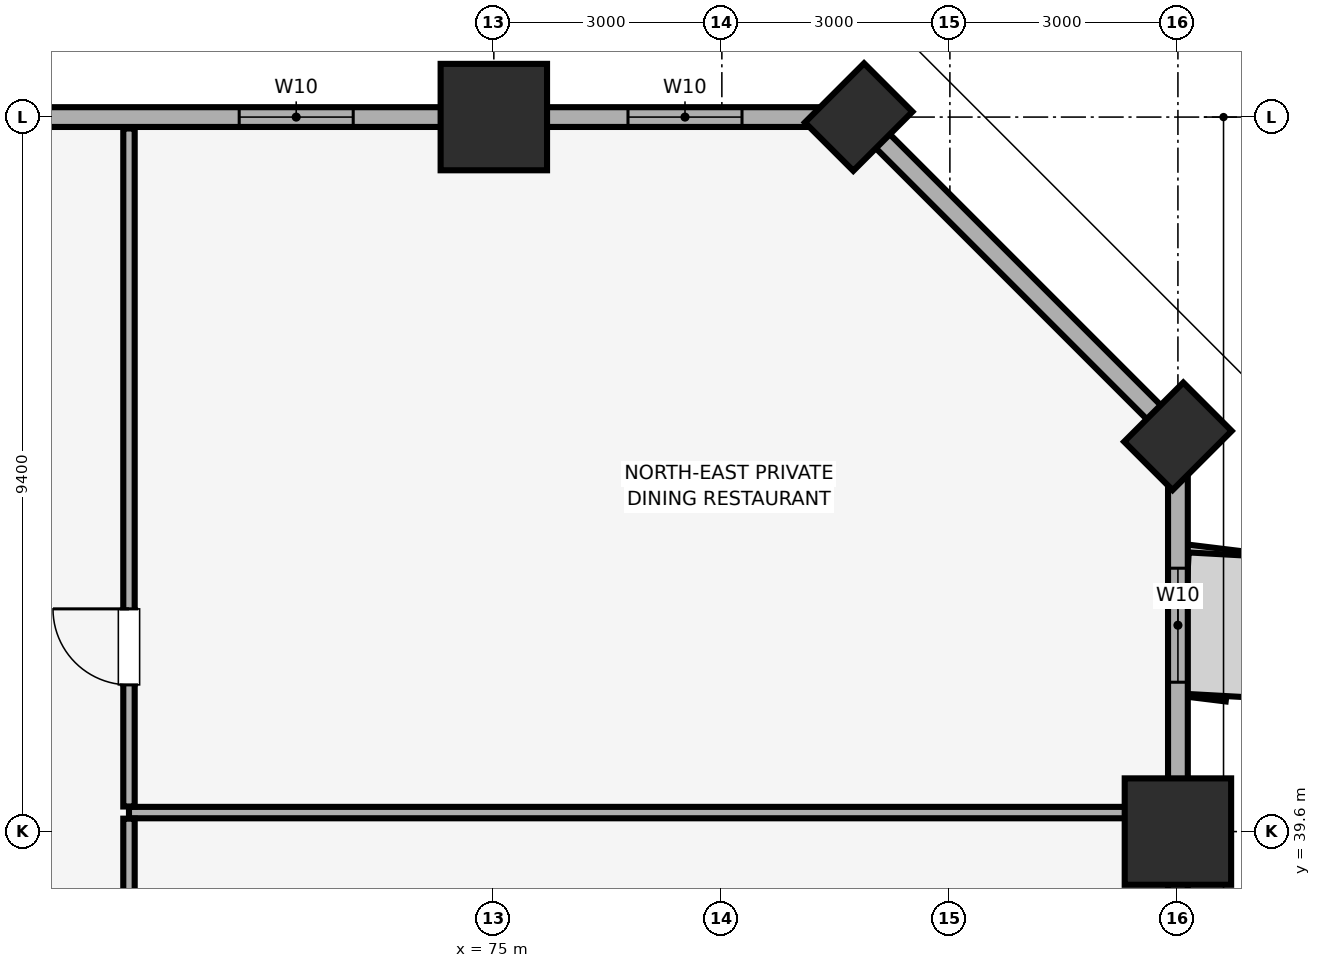
"""IFC4 building model, lengths in metres.
Left out: names, types, materials, properties, quantities, classifications, styles, units other than length and angle.
Written with IfcOpenShell. Run it as: python <this file> out.ifc"""

import sys

from ifc_helpers import new_model, si_unit, direction, frame, frame_2d, origin, origin_2d, place, context, subcontext, project, spatial, rectangle, extrude, element, fill, save


model = new_model("IFC4")
c1 = context("Model", 3, precision=1e-05, world=origin(), true_north=direction((0.0, 1.0)))
c2 = subcontext(c1, "Body", "Model", "MODEL_VIEW")
j1 = project(units=[si_unit("LENGTHUNIT", "METRE"), si_unit("PLANEANGLEUNIT", "RADIAN")], contexts=[c1])
p1 = place(None, origin())
s1 = spatial("IfcSite", under=j1, at=p1, CompositionType="ELEMENT")
p2 = place(p1, origin())
s2 = spatial("IfcBuilding", under=s1, at=p2, CompositionType="ELEMENT")
p3 = place(p2, frame((0.0, 0.0, 46.4)))
s3 = spatial("IfcBuildingStorey", under=s2, at=p3, CompositionType="ELEMENT", Elevation=46.4)
p4 = place(p3, frame((84.0, 39.6, 0.0), z_axis=(0.0, 0.0, 1.0), x_axis=(1.0, 0.0, 0.0)))
e1 = element("IfcColumn", 1, at=p4, inside=s3, PredefinedType="COLUMN", context=c2, shape_type="SweptSolid", body=[
    extrude(rectangle(XDim=1.4, YDim=1.4, at=origin_2d()), origin(), (0.0, 0.0, 1.0), 3.51),
])
for number, where, z_axis, x_axis in (
    (2, (84.0, 44.8, 0.0), (0.0, 0.0, 1.0), (0.707, 0.707, 0.0)),
    (3, (79.8, 49.0, 0.0), (0.0, 0.0, 1.0), (0.707, 0.707, 0.0)),
):
    element("IfcColumn", number, at=place(p3, frame(where, z_axis=z_axis, x_axis=x_axis)), inside=s3, PredefinedType="PILASTER", context=c2, shape_type="SweptSolid", body=[
        extrude(rectangle(XDim=1.1, YDim=0.9, at=origin_2d()), origin(), (0.0, 0.0, 1.0), 3.51),
    ])
p5 = place(p3, frame((75.0, 49.0, 0.0), z_axis=(0.0, 0.0, 1.0), x_axis=(1.0, 0.0, 0.0)))
e4 = element("IfcColumn", 4, at=p5, inside=s3, PredefinedType="COLUMN", context=c2, shape_type="SweptSolid", body=[
    extrude(rectangle(XDim=1.4, YDim=1.4, at=origin_2d()), origin(), (0.0, 0.0, 1.0), 3.51),
])
p6 = place(p3, frame((84.0, 4.2, 0.0), z_axis=(0.0, 0.0, 1.0), x_axis=(0.0, 1.0, 0.0)))
e5 = element("IfcWall", 5, at=p6, inside=s3, PredefinedType="SOLIDWALL", context=c2, shape_type="SweptSolid", body=[
    extrude(rectangle(XDim=40.6, YDim=0.26, at=frame_2d((20.3, 0.0))), origin(), (0.0, 0.0, 1.0), 2.56),
])
p7 = place(p6, frame((3.85, 0.0, 0.85)))
e6 = element("IfcOpeningElement", 6, at=p7, cuts=e5, PredefinedType="OPENING", context=c2, shape_type="SweptSolid", body=[
    extrude(rectangle(XDim=1.5, YDim=1.4, at=frame_2d((0.75, 0.7))), frame((0.0, 0.14, 0.0), z_axis=(0.0, -1.0, 0.0), x_axis=(1.0, 0.0, 0.0)), (0.0, 0.0, 1.0), 0.28),
])
p8 = place(p6, frame((13.115, 0.0, 0.85)))
e7 = element("IfcOpeningElement", 7, at=p8, cuts=e5, PredefinedType="OPENING", context=c2, shape_type="SweptSolid", body=[
    extrude(rectangle(XDim=1.5, YDim=1.4, at=frame_2d((0.75, 0.7))), frame((0.0, 0.14, 0.0), z_axis=(0.0, -1.0, 0.0), x_axis=(1.0, 0.0, 0.0)), (0.0, 0.0, 1.0), 0.28),
])
p9 = place(p6, frame((19.915, 0.0, 0.85)))
e8 = element("IfcOpeningElement", 8, at=p9, cuts=e5, PredefinedType="OPENING", context=c2, shape_type="SweptSolid", body=[
    extrude(rectangle(XDim=1.5, YDim=1.4, at=frame_2d((0.75, 0.7))), frame((0.0, 0.14, 0.0), z_axis=(0.0, -1.0, 0.0), x_axis=(1.0, 0.0, 0.0)), (0.0, 0.0, 1.0), 0.28),
])
p10 = place(p6, frame((27.165, 0.0, 0.85)))
e9 = element("IfcOpeningElement", 9, at=p10, cuts=e5, PredefinedType="OPENING", context=c2, shape_type="SweptSolid", body=[
    extrude(rectangle(XDim=1.5, YDim=1.4, at=frame_2d((0.75, 0.7))), frame((0.0, 0.14, 0.0), z_axis=(0.0, -1.0, 0.0), x_axis=(1.0, 0.0, 0.0)), (0.0, 0.0, 1.0), 0.28),
])
p11 = place(p6, frame((31.935, 0.0, 0.85)))
e10 = element("IfcOpeningElement", 10, at=p11, cuts=e5, PredefinedType="OPENING", context=c2, shape_type="SweptSolid", body=[
    extrude(rectangle(XDim=1.5, YDim=1.4, at=frame_2d((0.75, 0.7))), frame((0.0, 0.14, 0.0), z_axis=(0.0, -1.0, 0.0), x_axis=(1.0, 0.0, 0.0)), (0.0, 0.0, 1.0), 0.28),
])
p12 = place(p6, frame((37.365, 0.0, 0.85)))
e11 = element("IfcOpeningElement", 11, at=p12, cuts=e5, PredefinedType="OPENING", context=c2, shape_type="SweptSolid", body=[
    extrude(rectangle(XDim=1.5, YDim=1.4, at=frame_2d((0.75, 0.7))), frame((0.0, 0.14, 0.0), z_axis=(0.0, -1.0, 0.0), x_axis=(1.0, 0.0, 0.0)), (0.0, 0.0, 1.0), 0.28),
])
p13 = place(p3, frame((84.0, 44.8, 0.0), z_axis=(0.0, 0.0, 1.0), x_axis=(-0.707106781187, 0.707106781187, 0.0)))
e12 = element("IfcWall", 12, at=p13, inside=s3, PredefinedType="SOLIDWALL", context=c2, shape_type="SweptSolid", body=[
    extrude(rectangle(XDim=5.94, YDim=0.26, at=frame_2d((2.97, 0.0))), origin(), (0.0, 0.0, 1.0), 2.56),
])
p14 = place(p3, frame((79.8, 49.0, 0.0), z_axis=(0.0, 0.0, 1.0), x_axis=(-1.0, 0.0, 0.0)))
e13 = element("IfcWall", 13, at=p14, inside=s3, PredefinedType="SOLIDWALL", context=c2, shape_type="SweptSolid", body=[
    extrude(rectangle(XDim=75.6, YDim=0.26, at=frame_2d((37.8, 0.0))), origin(), (0.0, 0.0, 1.0), 2.56),
])
p15 = place(p14, frame((72.565, 0.0, 0.85)))
e14 = element("IfcOpeningElement", 14, at=p15, cuts=e13, PredefinedType="OPENING", context=c2, shape_type="SweptSolid", body=[
    extrude(rectangle(XDim=1.5, YDim=1.4, at=frame_2d((0.75, 0.7))), frame((0.0, 0.14, 0.0), z_axis=(0.0, -1.0, 0.0), x_axis=(1.0, 0.0, 0.0)), (0.0, 0.0, 1.0), 0.28),
])
p16 = place(p14, frame((67.45, 0.0, 0.85)))
e15 = element("IfcOpeningElement", 15, at=p16, cuts=e13, PredefinedType="OPENING", context=c2, shape_type="SweptSolid", body=[
    extrude(rectangle(XDim=1.5, YDim=1.4, at=frame_2d((0.75, 0.7))), frame((0.0, 0.14, 0.0), z_axis=(0.0, -1.0, 0.0), x_axis=(1.0, 0.0, 0.0)), (0.0, 0.0, 1.0), 0.28),
])
p17 = place(p14, frame((6.65, 0.0, 0.85)))
e16 = element("IfcOpeningElement", 16, at=p17, cuts=e13, PredefinedType="OPENING", context=c2, shape_type="SweptSolid", body=[
    extrude(rectangle(XDim=1.5, YDim=1.4, at=frame_2d((0.75, 0.7))), frame((0.0, 0.14, 0.0), z_axis=(0.0, -1.0, 0.0), x_axis=(1.0, 0.0, 0.0)), (0.0, 0.0, 1.0), 0.28),
])
p18 = place(p14, frame((1.535, 0.0, 0.85)))
e17 = element("IfcOpeningElement", 17, at=p18, cuts=e13, PredefinedType="OPENING", context=c2, shape_type="SweptSolid", body=[
    extrude(rectangle(XDim=1.5, YDim=1.4, at=frame_2d((0.75, 0.7))), frame((0.0, 0.14, 0.0), z_axis=(0.0, -1.0, 0.0), x_axis=(1.0, 0.0, 0.0)), (0.0, 0.0, 1.0), 0.28),
])
p19 = place(p14, frame((51.365, 0.0, 0.9)))
e18 = element("IfcOpeningElement", 18, at=p19, cuts=e13, PredefinedType="OPENING", context=c2, shape_type="SweptSolid", body=[
    extrude(rectangle(XDim=1.5, YDim=1.4, at=frame_2d((0.75, 0.7))), frame((0.0, 0.14, 0.0), z_axis=(0.0, -1.0, 0.0), x_axis=(1.0, 0.0, 0.0)), (0.0, 0.0, 1.0), 0.28),
])
p20 = place(p14, frame((44.55, 0.0, 0.9)))
e19 = element("IfcOpeningElement", 19, at=p20, cuts=e13, PredefinedType="OPENING", context=c2, shape_type="SweptSolid", body=[
    extrude(rectangle(XDim=1.5, YDim=1.4, at=frame_2d((0.75, 0.7))), frame((0.0, 0.14, 0.0), z_axis=(0.0, -1.0, 0.0), x_axis=(1.0, 0.0, 0.0)), (0.0, 0.0, 1.0), 0.28),
])
p21 = place(p14, frame((28.1, 0.0, 0.9)))
e20 = element("IfcOpeningElement", 20, at=p21, cuts=e13, PredefinedType="OPENING", context=c2, shape_type="SweptSolid", body=[
    extrude(rectangle(XDim=1.5, YDim=1.4, at=frame_2d((0.75, 0.7))), frame((0.0, 0.14, 0.0), z_axis=(0.0, -1.0, 0.0), x_axis=(1.0, 0.0, 0.0)), (0.0, 0.0, 1.0), 0.28),
])
p22 = place(p14, frame((23.485, 0.0, 0.9)))
e21 = element("IfcOpeningElement", 21, at=p22, cuts=e13, PredefinedType="OPENING", context=c2, shape_type="SweptSolid", body=[
    extrude(rectangle(XDim=1.5, YDim=1.4, at=frame_2d((0.75, 0.7))), frame((0.0, 0.14, 0.0), z_axis=(0.0, -1.0, 0.0), x_axis=(1.0, 0.0, 0.0)), (0.0, 0.0, 1.0), 0.28),
])
p23 = place(p3, frame((70.2, 39.85, 0.0), z_axis=(0.0, 0.0, 1.0), x_axis=(1.0, 0.0, 0.0)))
e22 = element("IfcWall", 22, at=p23, inside=s3, PredefinedType="PARTITIONING", context=c2, shape_type="SweptSolid", body=[
    extrude(rectangle(XDim=13.65, YDim=0.15, at=frame_2d((6.825, 0.0))), origin(), (0.0, 0.0, 1.0), 3.51),
])
p24 = place(p3, frame((70.2, 29.495, 0.0), z_axis=(0.0, 0.0, 1.0), x_axis=(0.0, 1.0, 0.0)))
e23 = element("IfcWall", 23, at=p24, inside=s3, PredefinedType="PARTITIONING", context=c2, shape_type="SweptSolid", body=[
    extrude(rectangle(XDim=10.275, YDim=0.15, at=frame_2d((5.137, 0.0))), origin(), (0.0, 0.0, 1.0), 3.51),
])
p25 = place(p24, frame((4.625, 0.0, 0.0)))
e24 = element("IfcOpeningElement", 24, at=p25, cuts=e23, PredefinedType="OPENING", context=c2, shape_type="SweptSolid", body=[
    extrude(rectangle(XDim=1.0, YDim=2.15, at=frame_2d((0.5, 1.075))), frame((0.0, 0.085, 0.0), z_axis=(0.0, -1.0, 0.0), x_axis=(1.0, 0.0, 0.0)), (0.0, 0.0, 1.0), 0.17),
])
p26 = place(p3, frame((70.2, 39.93, 0.0), z_axis=(0.0, 0.0, 1.0), x_axis=(0.0, 1.0, 0.0)))
e25 = element("IfcWall", 25, at=p26, inside=s3, PredefinedType="PARTITIONING", context=c2, shape_type="SweptSolid", body=[
    extrude(rectangle(XDim=8.92, YDim=0.15, at=frame_2d((4.46, 0.0))), origin(), (0.0, 0.0, 1.0), 3.51),
])
p27 = place(p26, frame((1.6, 0.0, 0.0)))
e26 = element("IfcOpeningElement", 26, at=p27, cuts=e25, PredefinedType="OPENING", context=c2, shape_type="SweptSolid", body=[
    extrude(rectangle(XDim=1.0, YDim=2.15, at=frame_2d((0.5, 1.075))), frame((0.0, 0.085, 0.0), z_axis=(0.0, -1.0, 0.0), x_axis=(1.0, 0.0, 0.0)), (0.0, 0.0, 1.0), 0.17),
])
p28 = place(p12, origin())
e27 = element("IfcWindow", 27, at=p28, inside=s3, PartitioningType="SINGLE_PANEL", PredefinedType="WINDOW", context=c2, shape_type="SweptSolid", body=[
    extrude(rectangle(XDim=1.5, YDim=1.4, at=frame_2d((0.75, 0.7))), frame((0.0, 0.03, 0.0), z_axis=(0.0, -1.0, 0.0), x_axis=(1.0, 0.0, 0.0)), (0.0, 0.0, 1.0), 0.06),
])
fill(e11, e27)
p29 = place(p17, origin())
e28 = element("IfcWindow", 28, at=p29, inside=s3, PartitioningType="SINGLE_PANEL", PredefinedType="WINDOW", context=c2, shape_type="SweptSolid", body=[
    extrude(rectangle(XDim=1.5, YDim=1.4, at=frame_2d((0.75, 0.7))), frame((0.0, 0.03, 0.0), z_axis=(0.0, -1.0, 0.0), x_axis=(1.0, 0.0, 0.0)), (0.0, 0.0, 1.0), 0.06),
])
fill(e16, e28)
p30 = place(p18, origin())
e29 = element("IfcWindow", 29, at=p30, inside=s3, PartitioningType="SINGLE_PANEL", PredefinedType="WINDOW", context=c2, shape_type="SweptSolid", body=[
    extrude(rectangle(XDim=1.5, YDim=1.4, at=frame_2d((0.75, 0.7))), frame((0.0, 0.03, 0.0), z_axis=(0.0, -1.0, 0.0), x_axis=(1.0, 0.0, 0.0)), (0.0, 0.0, 1.0), 0.06),
])
fill(e17, e29)
p31 = place(p27, origin())
e30 = element("IfcDoor", 30, at=p31, inside=s3, OperationType="SINGLE_SWING_RIGHT", PredefinedType="DOOR", context=c2, shape_type="SweptSolid", body=[
    extrude(rectangle(XDim=1.0, YDim=2.15, at=frame_2d((0.5, 1.075))), frame((0.0, 0.025, 0.0), z_axis=(0.0, -1.0, 0.0), x_axis=(1.0, 0.0, 0.0)), (0.0, 0.0, 1.0), 0.05),
])
fill(e26, e30)
save(model, sys.argv[1])
